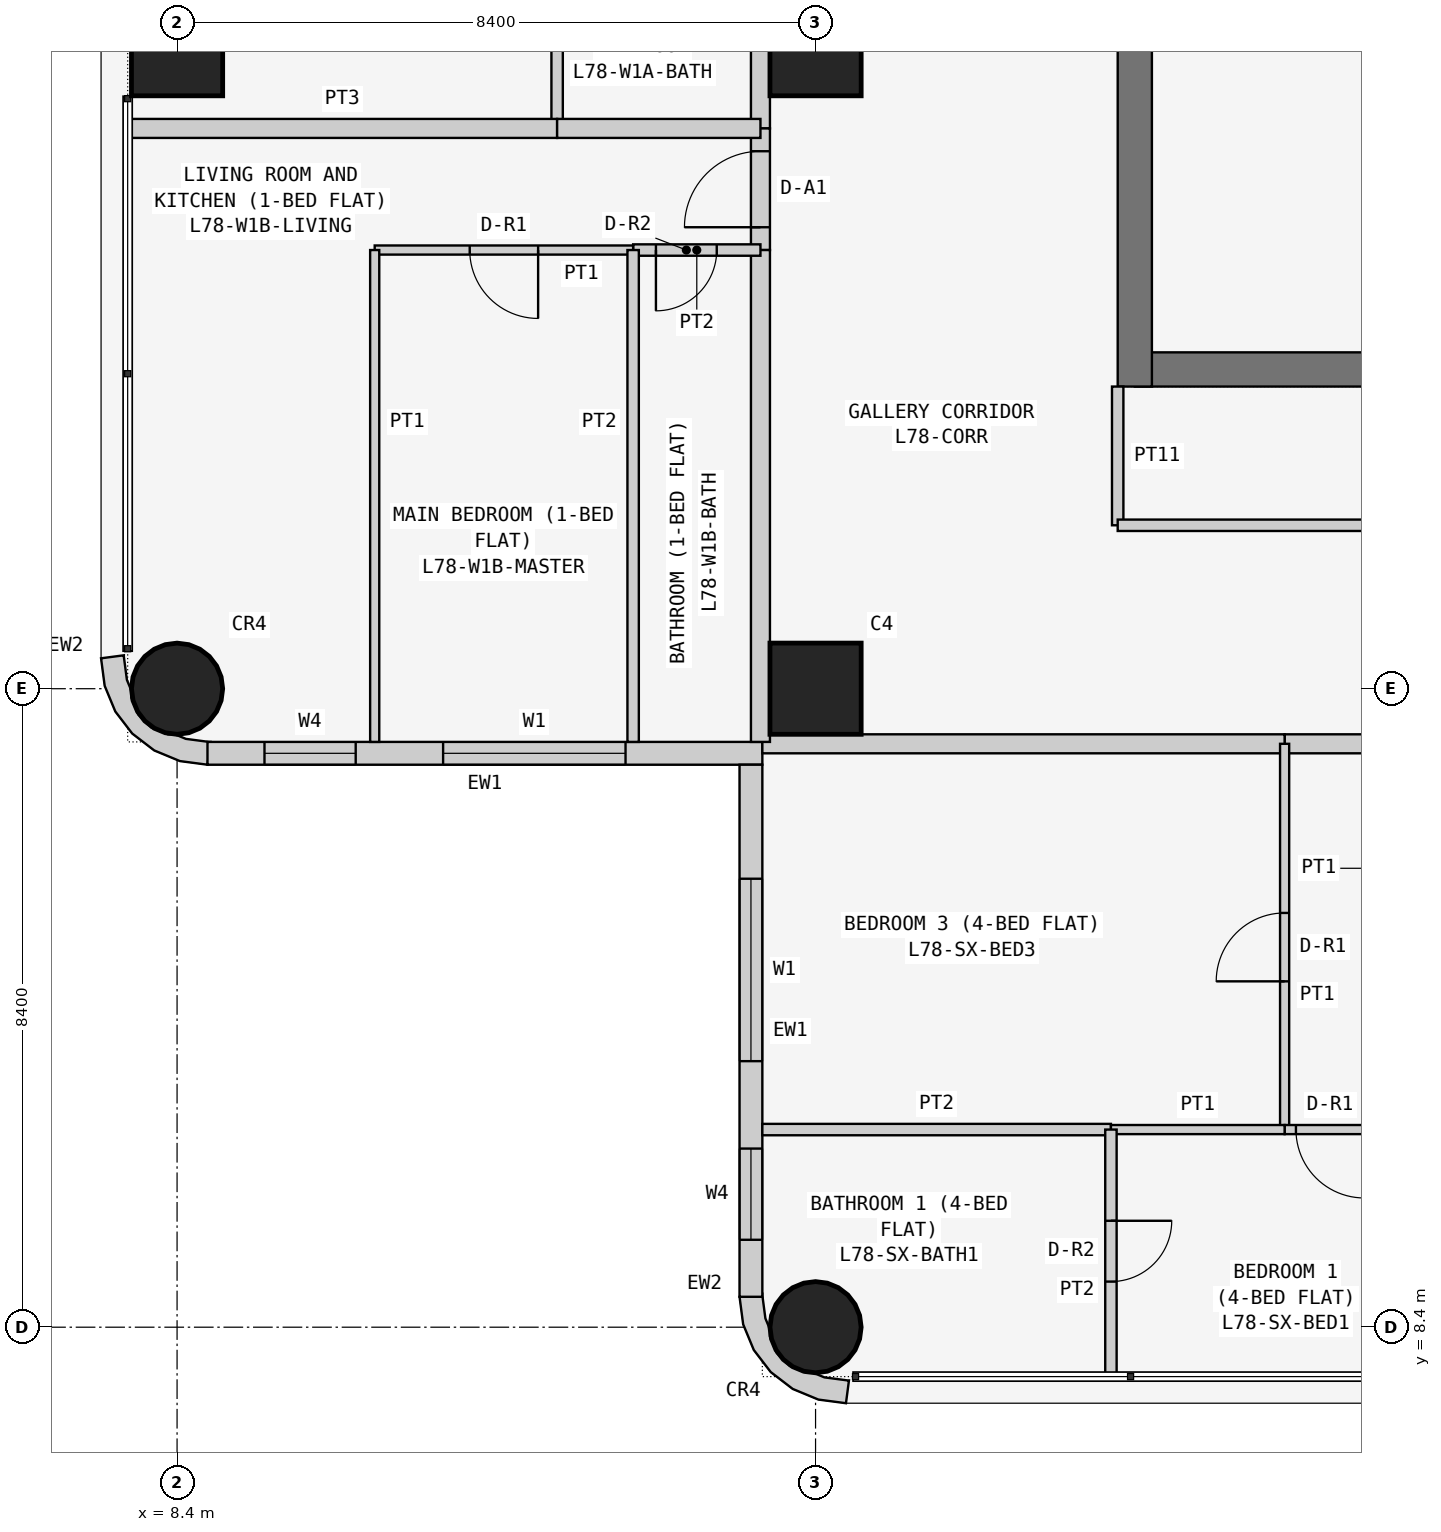
"""IFC4 building model, lengths in metres.
Left out: names, types, materials, properties, quantities, classifications, styles, units other than length and angle.
Written with IfcOpenShell. Run it as: python <this file> out.ifc"""

import sys

from ifc_helpers import new_model, si_unit, direction, frame, frame_2d, origin, origin_2d, place, context, subcontext, project, spatial, polyline, rectangle, circle, outline, extrude, element, fill, save


model = new_model("IFC4")
c1 = context("Model", 3, precision=1e-05, world=origin(), true_north=direction((0.0, 1.0)))
c2 = subcontext(c1, "Body", "Model", "MODEL_VIEW")
j1 = project(units=[si_unit("LENGTHUNIT", "METRE"), si_unit("PLANEANGLEUNIT", "RADIAN")], contexts=[c1])
p1 = place(None, origin())
s1 = spatial("IfcSite", under=j1, at=p1, CompositionType="ELEMENT")
p2 = place(p1, origin())
s2 = spatial("IfcBuilding", under=s1, at=p2, CompositionType="ELEMENT")
p3 = place(p2, frame((0.0, 0.0, 297.3)))
s3 = spatial("IfcBuildingStorey", under=s2, at=p3, CompositionType="ELEMENT", Elevation=297.3)
p4 = place(p3, frame((8.4, 16.8, 0.0), z_axis=(0.0, 0.0, 1.0), x_axis=(1.0, 0.0, 0.0)))
e1 = element("IfcColumn", 1, at=p4, inside=s3, PredefinedType="COLUMN", context=c2, shape_type="SweptSolid", body=[
    extrude(circle(Radius=0.6, at=origin_2d()), origin(), (0.0, 0.0, 1.0), 3.6),
])
p5 = place(p3, frame((8.4, 25.2, 0.0), z_axis=(0.0, 0.0, 1.0), x_axis=(1.0, 0.0, 0.0)))
e2 = element("IfcColumn", 2, at=p5, inside=s3, PredefinedType="COLUMN", context=c2, shape_type="SweptSolid", body=[
    extrude(rectangle(XDim=1.2, YDim=1.2, at=origin_2d()), origin(), (0.0, 0.0, 1.0), 3.6),
])
p6 = place(p3, frame((16.8, 8.4, 0.0), z_axis=(0.0, 0.0, 1.0), x_axis=(1.0, 0.0, 0.0)))
e3 = element("IfcColumn", 3, at=p6, inside=s3, PredefinedType="COLUMN", context=c2, shape_type="SweptSolid", body=[
    extrude(circle(Radius=0.6, at=origin_2d()), origin(), (0.0, 0.0, 1.0), 3.6),
])
for number, where, z_axis, x_axis in (
    (4, (16.8, 16.8, 0.0), (0.0, 0.0, 1.0), (1.0, 0.0, 0.0)),
    (5, (16.8, 25.2, 0.0), (0.0, 0.0, 1.0), (1.0, 0.0, 0.0)),
):
    element("IfcColumn", number, at=place(p3, frame(where, z_axis=z_axis, x_axis=x_axis)), inside=s3, PredefinedType="COLUMN", context=c2, shape_type="SweptSolid", body=[
        extrude(rectangle(XDim=1.2, YDim=1.2, at=origin_2d()), origin(), (0.0, 0.0, 1.0), 3.6),
    ])
p7 = place(p3, frame((21.0, 21.0, 0.0), z_axis=(0.0, 0.0, 1.0), x_axis=(1.0, 0.0, 0.0)))
e6 = element("IfcWall", 6, at=p7, inside=s3, PredefinedType="SHEAR", context=c2, shape_type="SweptSolid", body=[
    extrude(rectangle(XDim=17.025, YDim=0.45, at=frame_2d((8.512, 0.0))), origin(), (0.0, 0.0, 1.0), 3.6),
])
p8 = place(p3, frame((21.0, 37.8, 0.0), z_axis=(0.0, 0.0, 1.0), x_axis=(0.0, -1.0, 0.0)))
e7 = element("IfcWall", 7, at=p8, inside=s3, PredefinedType="SHEAR", context=c2, shape_type="SweptSolid", body=[
    extrude(rectangle(XDim=17.025, YDim=0.45, at=frame_2d((8.513, 0.0))), origin(), (0.0, 0.0, 1.0), 3.6),
])
p9 = place(p8, frame((5.4, 0.0, 0.0)))
e8 = element("IfcOpeningElement", 8, at=p9, cuts=e7, PredefinedType="OPENING", context=c2, shape_type="SweptSolid", body=[
    extrude(rectangle(XDim=1.2, YDim=2.1, at=frame_2d((0.6, 1.05))), frame((0.0, 0.235, 0.0), z_axis=(0.0, -1.0, 0.0), x_axis=(1.0, 0.0, 0.0)), (0.0, 0.0, 1.0), 0.47),
])
p10 = place(p3, frame((8.8, 15.95, 0.0), z_axis=(0.0, 0.0, 1.0), x_axis=(1.0, 0.0, 0.0)))
e9 = element("IfcWall", 9, at=p10, inside=s3, PredefinedType="SOLIDWALL", context=c2, shape_type="SweptSolid", body=[
    extrude(rectangle(XDim=7.3, YDim=0.3, at=frame_2d((3.65, 0.0))), origin(), (0.0, 0.0, 1.0), 3.35),
])
p11 = place(p10, frame((3.1, 0.0, 0.9)))
e10 = element("IfcOpeningElement", 10, at=p11, cuts=e9, PredefinedType="OPENING", context=c2, shape_type="SweptSolid", body=[
    extrude(rectangle(XDim=2.4, YDim=1.5, at=frame_2d((1.2, 0.75))), frame((0.0, 0.16, 0.0), z_axis=(0.0, -1.0, 0.0), x_axis=(1.0, 0.0, 0.0)), (0.0, 0.0, 1.0), 0.32),
])
p12 = place(p10, frame((0.75, 0.0, 0.9)))
e11 = element("IfcOpeningElement", 11, at=p12, cuts=e9, PredefinedType="OPENING", context=c2, shape_type="SweptSolid", body=[
    extrude(rectangle(XDim=1.2, YDim=1.5, at=frame_2d((0.6, 0.75))), frame((0.0, 0.16, 0.0), z_axis=(0.0, -1.0, 0.0), x_axis=(1.0, 0.0, 0.0)), (0.0, 0.0, 1.0), 0.32),
])
p13 = place(p3, frame((15.95, 15.8, 0.0), z_axis=(0.0, 0.0, 1.0), x_axis=(0.0, -1.0, 0.0)))
e12 = element("IfcWall", 12, at=p13, inside=s3, PredefinedType="SOLIDWALL", context=c2, shape_type="SweptSolid", body=[
    extrude(rectangle(XDim=7.0, YDim=0.3, at=frame_2d((3.5, 0.0))), origin(), (0.0, 0.0, 1.0), 3.35),
])
p14 = place(p13, frame((1.5, 0.0, 0.9)))
e13 = element("IfcOpeningElement", 13, at=p14, cuts=e12, PredefinedType="OPENING", context=c2, shape_type="SweptSolid", body=[
    extrude(rectangle(XDim=2.4, YDim=1.5, at=frame_2d((1.2, 0.75))), frame((0.0, 0.16, 0.0), z_axis=(0.0, -1.0, 0.0), x_axis=(1.0, 0.0, 0.0)), (0.0, 0.0, 1.0), 0.32),
])
p15 = place(p13, frame((5.05, 0.0, 0.9)))
e14 = element("IfcOpeningElement", 14, at=p15, cuts=e12, PredefinedType="OPENING", context=c2, shape_type="SweptSolid", body=[
    extrude(rectangle(XDim=1.2, YDim=1.5, at=frame_2d((0.6, 0.75))), frame((0.0, 0.16, 0.0), z_axis=(0.0, -1.0, 0.0), x_axis=(1.0, 0.0, 0.0)), (0.0, 0.0, 1.0), 0.32),
])
p16 = place(p3, frame((7.824, 17.162, 0.0), z_axis=(0.0, 0.0, 1.0), x_axis=(-0.707106781187, -0.707106781187, 0.0)))
e15 = element("IfcWall", 15, at=p16, inside=s3, PredefinedType="SOLIDWALL", context=c2, shape_type="SweptSolid", body=[
    extrude(outline(polyline([(0.047, 1.454), (0.233, 1.212), (0.292, 1.069), (0.358, 1.003), (0.449, 0.782), (0.449, 0.543), (0.358, 0.323), (0.292, 0.257), (0.233, 0.114), (0.047, -0.129), (0.033, -0.143), (0.273, -0.327), (0.495, -0.037), (0.635, 0.301), (0.683, 0.663), (0.635, 1.025), (0.495, 1.363), (0.273, 1.653), (0.033, 1.469), (0.047, 1.454)])), origin(), (0.0, 0.0, 1.0), 3.35),
])
p17 = place(p3, frame((16.224, 8.762, 0.0), z_axis=(0.0, 0.0, 1.0), x_axis=(-0.707106781187, -0.707106781187, 0.0)))
e16 = element("IfcWall", 16, at=p17, inside=s3, PredefinedType="SOLIDWALL", context=c2, shape_type="SweptSolid", body=[
    extrude(outline(polyline([(0.033, 1.469), (0.047, 1.455), (0.233, 1.212), (0.292, 1.069), (0.358, 1.003), (0.449, 0.783), (0.449, 0.543), (0.358, 0.322), (0.292, 0.257), (0.233, 0.114), (0.047, -0.129), (0.033, -0.143), (0.273, -0.327), (0.495, -0.037), (0.635, 0.3), (0.683, 0.663), (0.635, 1.025), (0.495, 1.363), (0.273, 1.653), (0.033, 1.469)])), origin(), (0.0, 0.0, 1.0), 3.35),
])
p18 = place(p3, frame((20.775, 20.775, 0.0), z_axis=(0.0, 0.0, 1.0), x_axis=(0.0, -1.0, 0.0)))
e17 = element("IfcWall", 17, at=p18, inside=s3, PredefinedType="PARTITIONING", context=c2, shape_type="SweptSolid", body=[
    extrude(rectangle(XDim=1.825, YDim=0.15, at=frame_2d((0.913, 0.0))), origin(), (0.0, 0.0, 1.0), 3.35),
])
p19 = place(p3, frame((20.775, 18.95, 0.0), z_axis=(0.0, 0.0, 1.0), x_axis=(1.0, 0.0, 0.0)))
e18 = element("IfcWall", 18, at=p19, inside=s3, PredefinedType="PARTITIONING", context=c2, shape_type="SweptSolid", body=[
    extrude(rectangle(XDim=11.925, YDim=0.15, at=frame_2d((5.962, 0.0))), origin(), (0.0, 0.0, 1.0), 3.35),
])
p20 = place(p19, frame((8.125, 0.0, 0.0)))
e19 = element("IfcOpeningElement", 19, at=p20, cuts=e18, PredefinedType="OPENING", context=c2, shape_type="SweptSolid", body=[
    extrude(rectangle(XDim=1.0, YDim=2.1, at=frame_2d((0.5, 1.05))), frame((0.0, 0.085, 0.0), z_axis=(0.0, -1.0, 0.0), x_axis=(1.0, 0.0, 0.0)), (0.0, 0.0, 1.0), 0.17),
])
p21 = place(p3, frame((24.171, 16.075, 0.0), z_axis=(0.0, 0.0, 1.0), x_axis=(-1.0, 0.0, 0.0)))
e20 = element("IfcWall", 20, at=p21, inside=s3, PredefinedType="PARTITIONING", context=c2, shape_type="SweptSolid", body=[
    extrude(rectangle(XDim=1.2, YDim=0.25, at=frame_2d((0.6, 0.0))), origin(), (0.0, 0.0, 1.0), 3.35),
])
p22 = place(p3, frame((22.971, 16.075, 0.0), z_axis=(0.0, 0.0, 1.0), x_axis=(-1.0, 0.0, 0.0)))
e21 = element("IfcWall", 21, at=p22, inside=s3, PredefinedType="PARTITIONING", context=c2, shape_type="SweptSolid", body=[
    extrude(rectangle(XDim=6.871, YDim=0.25, at=frame_2d((3.436, 0.0))), origin(), (0.0, 0.0, 1.0), 3.35),
])
p23 = place(p3, frame((16.075, 24.171, 0.0), z_axis=(0.0, 0.0, 1.0), x_axis=(0.0, 1.0, 0.0)))
e22 = element("IfcWall", 22, at=p23, inside=s3, PredefinedType="PARTITIONING", context=c2, shape_type="SweptSolid", body=[
    extrude(rectangle(XDim=2.629, YDim=0.25, at=frame_2d((1.314, 0.0))), origin(), (0.0, 0.0, 1.0), 3.35),
])
p24 = place(p3, frame((16.075, 22.571, 0.0), z_axis=(0.0, 0.0, 1.0), x_axis=(0.0, 1.0, 0.0)))
e23 = element("IfcWall", 23, at=p24, inside=s3, PredefinedType="PARTITIONING", context=c2, shape_type="SweptSolid", body=[
    extrude(rectangle(XDim=1.6, YDim=0.25, at=frame_2d((0.8, 0.0))), origin(), (0.0, 0.0, 1.0), 3.35),
])
p25 = place(p24, frame((0.3, 0.0, 0.0)))
e24 = element("IfcOpeningElement", 24, at=p25, cuts=e23, PredefinedType="OPENING", context=c2, shape_type="SweptSolid", body=[
    extrude(rectangle(XDim=1.0, YDim=2.1, at=frame_2d((0.5, 1.05))), frame((0.0, 0.135, 0.0), z_axis=(0.0, -1.0, 0.0), x_axis=(1.0, 0.0, 0.0)), (0.0, 0.0, 1.0), 0.27),
])
p26 = place(p3, frame((16.075, 16.1, 0.0), z_axis=(0.0, 0.0, 1.0), x_axis=(0.0, 1.0, 0.0)))
e25 = element("IfcWall", 25, at=p26, inside=s3, PredefinedType="PARTITIONING", context=c2, shape_type="SweptSolid", body=[
    extrude(rectangle(XDim=6.471, YDim=0.25, at=frame_2d((3.235, 0.0))), origin(), (0.0, 0.0, 1.0), 3.35),
])
p27 = place(p3, frame((22.971, 11.0, 0.0), z_axis=(0.0, 0.0, 1.0), x_axis=(0.0, 1.0, 0.0)))
e26 = element("IfcWall", 26, at=p27, inside=s3, PredefinedType="PARTITIONING", context=c2, shape_type="SweptSolid", body=[
    extrude(rectangle(XDim=5.075, YDim=0.12, at=frame_2d((2.538, 0.0))), origin(), (0.0, 0.0, 1.0), 3.35),
])
p28 = place(p27, frame((1.95, 0.0, 0.0)))
e27 = element("IfcOpeningElement", 27, at=p28, cuts=e26, PredefinedType="OPENING", context=c2, shape_type="SweptSolid", body=[
    extrude(rectangle(XDim=0.9, YDim=2.1, at=frame_2d((0.45, 1.05))), frame((0.0, 0.07, 0.0), z_axis=(0.0, -1.0, 0.0), x_axis=(1.0, 0.0, 0.0)), (0.0, 0.0, 1.0), 0.14),
])
p29 = place(p3, frame((24.171, 11.0, 0.0), z_axis=(0.0, 0.0, 1.0), x_axis=(-1.0, 0.0, 0.0)))
e28 = element("IfcWall", 28, at=p29, inside=s3, PredefinedType="PARTITIONING", context=c2, shape_type="SweptSolid", body=[
    extrude(rectangle(XDim=1.2, YDim=0.12, at=frame_2d((0.6, 0.0))), origin(), (0.0, 0.0, 1.0), 3.35),
])
p30 = place(p29, frame((0.151, 0.0, 0.0)))
e29 = element("IfcOpeningElement", 29, at=p30, cuts=e28, PredefinedType="OPENING", context=c2, shape_type="SweptSolid", body=[
    extrude(rectangle(XDim=0.9, YDim=2.1, at=frame_2d((0.45, 1.05))), frame((0.0, 0.07, 0.0), z_axis=(0.0, -1.0, 0.0), x_axis=(1.0, 0.0, 0.0)), (0.0, 0.0, 1.0), 0.14),
])
p31 = place(p3, frame((16.1, 11.0, 0.0), z_axis=(0.0, 0.0, 1.0), x_axis=(1.0, 0.0, 0.0)))
e30 = element("IfcWall", 30, at=p31, inside=s3, PredefinedType="PARTITIONING", context=c2, shape_type="SweptSolid", body=[
    extrude(rectangle(XDim=4.586, YDim=0.15, at=frame_2d((2.293, 0.0))), origin(), (0.0, 0.0, 1.0), 3.35),
])
p32 = place(p3, frame((20.686, 11.0, 0.0), z_axis=(0.0, 0.0, 1.0), x_axis=(1.0, 0.0, 0.0)))
e31 = element("IfcWall", 31, at=p32, inside=s3, PredefinedType="PARTITIONING", context=c2, shape_type="SweptSolid", body=[
    extrude(rectangle(XDim=2.285, YDim=0.12, at=frame_2d((1.143, 0.0))), origin(), (0.0, 0.0, 1.0), 3.35),
])
p33 = place(p3, frame((20.686, 7.75, 0.0), z_axis=(0.0, 0.0, 1.0), x_axis=(0.0, 1.0, 0.0)))
e32 = element("IfcWall", 32, at=p33, inside=s3, PredefinedType="PARTITIONING", context=c2, shape_type="SweptSolid", body=[
    extrude(rectangle(XDim=3.25, YDim=0.15, at=frame_2d((1.625, 0.0))), origin(), (0.0, 0.0, 1.0), 3.35),
])
p34 = place(p33, frame((1.25, 0.0, 0.0)))
e33 = element("IfcOpeningElement", 33, at=p34, cuts=e32, PredefinedType="OPENING", context=c2, shape_type="SweptSolid", body=[
    extrude(rectangle(XDim=0.8, YDim=2.1, at=frame_2d((0.4, 1.05))), frame((0.0, 0.085, 0.0), z_axis=(0.0, -1.0, 0.0), x_axis=(1.0, 0.0, 0.0)), (0.0, 0.0, 1.0), 0.17),
])
p35 = place(p3, frame((13.4, 26.8, 0.0), z_axis=(0.0, 0.0, 1.0), x_axis=(0.0, -1.0, 0.0)))
e34 = element("IfcWall", 34, at=p35, inside=s3, PredefinedType="PARTITIONING", context=c2, shape_type="SweptSolid", body=[
    extrude(rectangle(XDim=2.629, YDim=0.15, at=frame_2d((1.314, 0.0))), origin(), (0.0, 0.0, 1.0), 3.35),
])
p36 = place(p3, frame((13.4, 24.171, 0.0), z_axis=(0.0, 0.0, 1.0), x_axis=(-1.0, 0.0, 0.0)))
e35 = element("IfcWall", 35, at=p36, inside=s3, PredefinedType="PARTITIONING", context=c2, shape_type="SweptSolid", body=[
    extrude(rectangle(XDim=5.65, YDim=0.25, at=frame_2d((2.825, 0.0))), origin(), (0.0, 0.0, 1.0), 3.35),
])
p37 = place(p3, frame((13.4, 24.171, 0.0), z_axis=(0.0, 0.0, 1.0), x_axis=(1.0, 0.0, 0.0)))
e36 = element("IfcWall", 36, at=p37, inside=s3, PredefinedType="PARTITIONING", context=c2, shape_type="SweptSolid", body=[
    extrude(rectangle(XDim=2.675, YDim=0.25, at=frame_2d((1.337, 0.0))), origin(), (0.0, 0.0, 1.0), 3.35),
])
p38 = place(p3, frame((16.075, 22.571, 0.0), z_axis=(0.0, 0.0, 1.0), x_axis=(-1.0, 0.0, 0.0)))
e37 = element("IfcWall", 37, at=p38, inside=s3, PredefinedType="PARTITIONING", context=c2, shape_type="SweptSolid", body=[
    extrude(rectangle(XDim=1.675, YDim=0.15, at=frame_2d((0.837, 0.0))), origin(), (0.0, 0.0, 1.0), 3.35),
])
p39 = place(p38, frame((0.575, 0.0, 0.0)))
e38 = element("IfcOpeningElement", 38, at=p39, cuts=e37, PredefinedType="OPENING", context=c2, shape_type="SweptSolid", body=[
    extrude(rectangle(XDim=0.8, YDim=2.1, at=frame_2d((0.4, 1.05))), frame((0.0, 0.085, 0.0), z_axis=(0.0, -1.0, 0.0), x_axis=(1.0, 0.0, 0.0)), (0.0, 0.0, 1.0), 0.17),
])
p40 = place(p3, frame((14.4, 22.571, 0.0), z_axis=(0.0, 0.0, 1.0), x_axis=(-1.0, 0.0, 0.0)))
e39 = element("IfcWall", 39, at=p40, inside=s3, PredefinedType="PARTITIONING", context=c2, shape_type="SweptSolid", body=[
    extrude(rectangle(XDim=3.4, YDim=0.12, at=frame_2d((1.7, 0.0))), origin(), (0.0, 0.0, 1.0), 3.35),
])
p41 = place(p40, frame((1.25, 0.0, 0.0)))
e40 = element("IfcOpeningElement", 40, at=p41, cuts=e39, PredefinedType="OPENING", context=c2, shape_type="SweptSolid", body=[
    extrude(rectangle(XDim=0.9, YDim=2.1, at=frame_2d((0.45, 1.05))), frame((0.0, 0.07, 0.0), z_axis=(0.0, -1.0, 0.0), x_axis=(1.0, 0.0, 0.0)), (0.0, 0.0, 1.0), 0.14),
])
p42 = place(p3, frame((11.0, 22.571, 0.0), z_axis=(0.0, 0.0, 1.0), x_axis=(0.0, -1.0, 0.0)))
e41 = element("IfcWall", 41, at=p42, inside=s3, PredefinedType="PARTITIONING", context=c2, shape_type="SweptSolid", body=[
    extrude(rectangle(XDim=6.471, YDim=0.12, at=frame_2d((3.235, 0.0))), origin(), (0.0, 0.0, 1.0), 3.35),
])
p43 = place(p3, frame((14.4, 22.571, 0.0), z_axis=(0.0, 0.0, 1.0), x_axis=(0.0, -1.0, 0.0)))
e42 = element("IfcWall", 42, at=p43, inside=s3, PredefinedType="PARTITIONING", context=c2, shape_type="SweptSolid", body=[
    extrude(rectangle(XDim=6.471, YDim=0.15, at=frame_2d((3.235, 0.0))), origin(), (0.0, 0.0, 1.0), 3.35),
])
p44 = place(p14, origin())
e43 = element("IfcWindow", 43, at=p44, inside=s3, PartitioningType="SINGLE_PANEL", PredefinedType="WINDOW", context=c2, shape_type="SweptSolid", body=[
    extrude(rectangle(XDim=2.4, YDim=1.5, at=frame_2d((1.2, 0.75))), frame((0.0, 0.03, 0.0), z_axis=(0.0, -1.0, 0.0), x_axis=(1.0, 0.0, 0.0)), (0.0, 0.0, 1.0), 0.06),
])
fill(e13, e43)
p45 = place(p15, origin())
e44 = element("IfcWindow", 44, at=p45, inside=s3, PartitioningType="SINGLE_PANEL", PredefinedType="WINDOW", context=c2, shape_type="SweptSolid", body=[
    extrude(rectangle(XDim=1.2, YDim=1.5, at=frame_2d((0.6, 0.75))), frame((0.0, 0.03, 0.0), z_axis=(0.0, -1.0, 0.0), x_axis=(1.0, 0.0, 0.0)), (0.0, 0.0, 1.0), 0.06),
])
fill(e14, e44)
p46 = place(p11, origin())
e45 = element("IfcWindow", 45, at=p46, inside=s3, PartitioningType="SINGLE_PANEL", PredefinedType="WINDOW", context=c2, shape_type="SweptSolid", body=[
    extrude(rectangle(XDim=2.4, YDim=1.5, at=frame_2d((1.2, 0.75))), frame((0.0, 0.03, 0.0), z_axis=(0.0, -1.0, 0.0), x_axis=(1.0, 0.0, 0.0)), (0.0, 0.0, 1.0), 0.06),
])
fill(e10, e45)
p47 = place(p12, origin())
e46 = element("IfcWindow", 46, at=p47, inside=s3, PartitioningType="SINGLE_PANEL", PredefinedType="WINDOW", context=c2, shape_type="SweptSolid", body=[
    extrude(rectangle(XDim=1.2, YDim=1.5, at=frame_2d((0.6, 0.75))), frame((0.0, 0.03, 0.0), z_axis=(0.0, -1.0, 0.0), x_axis=(1.0, 0.0, 0.0)), (0.0, 0.0, 1.0), 0.06),
])
fill(e11, e46)
p48 = place(p28, origin())
e47 = element("IfcDoor", 47, at=p48, inside=s3, OperationType="SINGLE_SWING_LEFT", PredefinedType="DOOR", context=c2, shape_type="SweptSolid", body=[
    extrude(rectangle(XDim=0.9, YDim=2.1, at=frame_2d((0.45, 1.05))), frame((0.0, 0.025, 0.0), z_axis=(0.0, -1.0, 0.0), x_axis=(1.0, 0.0, 0.0)), (0.0, 0.0, 1.0), 0.05),
])
fill(e27, e47)
p49 = place(p30, origin())
e48 = element("IfcDoor", 48, at=p49, inside=s3, OperationType="SINGLE_SWING_LEFT", PredefinedType="DOOR", context=c2, shape_type="SweptSolid", body=[
    extrude(rectangle(XDim=0.9, YDim=2.1, at=frame_2d((0.45, 1.05))), frame((0.0, 0.025, 0.0), z_axis=(0.0, -1.0, 0.0), x_axis=(1.0, 0.0, 0.0)), (0.0, 0.0, 1.0), 0.05),
])
fill(e29, e48)
p50 = place(p34, frame((0.8, 0.0, 0.0), z_axis=(0.0, 0.0, 1.0), x_axis=(-1.0, 0.0, 0.0)))
e49 = element("IfcDoor", 49, at=p50, inside=s3, OperationType="SINGLE_SWING_LEFT", PredefinedType="DOOR", context=c2, shape_type="SweptSolid", body=[
    extrude(rectangle(XDim=0.8, YDim=2.1, at=frame_2d((0.4, 1.05))), frame((0.0, 0.025, 0.0), z_axis=(0.0, -1.0, 0.0), x_axis=(1.0, 0.0, 0.0)), (0.0, 0.0, 1.0), 0.05),
])
fill(e33, e49)
p51 = place(p25, origin())
e50 = element("IfcDoor", 50, at=p51, inside=s3, OperationType="SINGLE_SWING_LEFT", PredefinedType="DOOR", context=c2, shape_type="SweptSolid", body=[
    extrude(rectangle(XDim=1.0, YDim=2.1, at=frame_2d((0.5, 1.05))), frame((0.0, 0.025, 0.0), z_axis=(0.0, -1.0, 0.0), x_axis=(1.0, 0.0, 0.0)), (0.0, 0.0, 1.0), 0.05),
])
fill(e24, e50)
p52 = place(p39, origin())
e51 = element("IfcDoor", 51, at=p52, inside=s3, OperationType="SINGLE_SWING_RIGHT", PredefinedType="DOOR", context=c2, shape_type="SweptSolid", body=[
    extrude(rectangle(XDim=0.8, YDim=2.1, at=frame_2d((0.4, 1.05))), frame((0.0, 0.025, 0.0), z_axis=(0.0, -1.0, 0.0), x_axis=(1.0, 0.0, 0.0)), (0.0, 0.0, 1.0), 0.05),
])
fill(e38, e51)
p53 = place(p41, origin())
e52 = element("IfcDoor", 52, at=p53, inside=s3, OperationType="SINGLE_SWING_LEFT", PredefinedType="DOOR", context=c2, shape_type="SweptSolid", body=[
    extrude(rectangle(XDim=0.9, YDim=2.1, at=frame_2d((0.45, 1.05))), frame((0.0, 0.025, 0.0), z_axis=(0.0, -1.0, 0.0), x_axis=(1.0, 0.0, 0.0)), (0.0, 0.0, 1.0), 0.05),
])
fill(e40, e52)
save(model, sys.argv[1])
